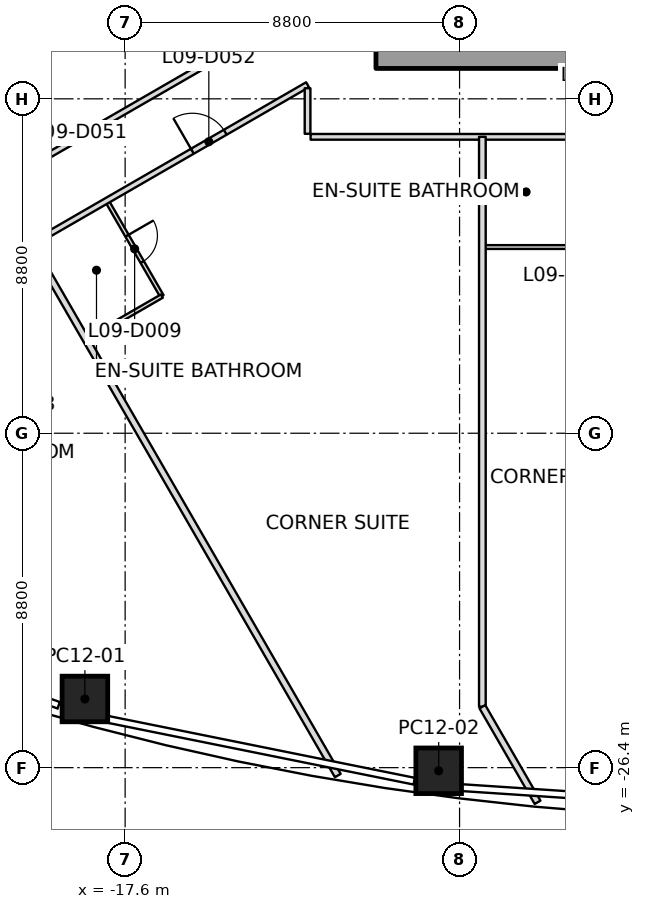
"""IFC4 building model, lengths in metres.
Left out: names, types, materials, properties, quantities, classifications, styles, units other than length and angle.
Written with IfcOpenShell. Run it as: python <this file> out.ifc"""

import sys

from ifc_helpers import new_model, si_unit, direction, frame, frame_2d, origin, origin_2d, place, context, subcontext, project, spatial, rectangle, extrude, clip, halfspace, element, fill, save


model = new_model("IFC4")
c1 = context("Model", 3, precision=1e-05, world=origin(), true_north=direction((0.0, 1.0)))
c2 = subcontext(c1, "Body", "Model", "MODEL_VIEW")
j1 = project(units=[si_unit("LENGTHUNIT", "METRE"), si_unit("PLANEANGLEUNIT", "RADIAN")], contexts=[c1])
p1 = place(None, origin())
s1 = spatial("IfcSite", under=j1, at=p1, CompositionType="ELEMENT")
p2 = place(p1, origin())
s2 = spatial("IfcBuilding", under=s1, at=p2, CompositionType="ELEMENT")
p3 = place(p2, frame((0.0, 0.0, 55.4)))
s3 = spatial("IfcBuildingStorey", under=s2, at=p3, CompositionType="ELEMENT", Elevation=55.4)
p4 = place(p3, frame((-18.659, -24.593, 0.0), z_axis=(0.018962740175, 0.175794991964, 0.984244144146), x_axis=(-0.964231408406, 0.26352619053, -0.028491015209)))
e1 = element("IfcColumn", 1, at=p4, inside=s3, PredefinedType="COLUMN", context=c2, shape_type="SweptSolid", body=[
    clip(clip(extrude(rectangle(XDim=1.2, YDim=1.2, at=origin_2d()), origin(), (0.0, 0.0, 1.0), 3.76), halfspace(frame((0.0, 0.0, 0.001)), True)), halfspace(frame((0.0, 0.0, 3.759)), False)),
])
p5 = place(p3, frame((-9.35, -26.482, 0.0), z_axis=(0.00938855127, 0.223717601847, 0.974608788042), x_axis=(0.984896435556, -0.170583568587, 0.029669131402)))
e2 = element("IfcColumn", 2, at=p5, inside=s3, PredefinedType="COLUMN", context=c2, shape_type="SweptSolid", body=[
    extrude(rectangle(XDim=1.2, YDim=1.2, at=origin_2d()), origin(), (0.0, 0.0, 1.0), 3.797),
])
p6 = place(p3, frame((-11.0, -7.75, 0.0), z_axis=(0.0, 0.0, 1.0), x_axis=(1.0, 0.0, 0.0)))
e3 = element("IfcWall", 3, at=p6, inside=s3, PredefinedType="SHEAR", context=c2, shape_type="SweptSolid", body=[
    extrude(rectangle(XDim=22.0, YDim=0.5, at=frame_2d((11.0, 0.0))), origin(), (0.0, 0.0, 1.0), 3.7),
])
p7 = place(p6, frame((10.45, 0.0, 0.0)))
e4 = element("IfcOpeningElement", 4, at=p7, cuts=e3, PredefinedType="OPENING", context=c2, shape_type="SweptSolid", body=[
    extrude(rectangle(XDim=1.1, YDim=2.1, at=frame_2d((0.55, 1.05))), frame((0.0, 0.25, 0.0), z_axis=(0.0, -1.0, 0.0), x_axis=(1.0, 0.0, 0.0)), (0.0, 0.0, 1.0), 0.5),
])
p8 = place(p3, frame((-20.075, -12.629, 0.0), z_axis=(0.0, 0.0, 1.0), x_axis=(0.499997848404, -0.866026646006, 0.0)))
e5 = element("IfcWall", 5, at=p8, inside=s3, PredefinedType="PARTITIONING", context=c2, shape_type="SweptSolid", body=[
    extrude(rectangle(XDim=16.141, YDim=0.175, at=frame_2d((8.07, 0.0))), origin(), (0.0, 0.0, 1.0), 2.784),
])
p9 = place(p3, frame((-8.2, -9.8, 0.0), z_axis=(0.0, 0.0, 1.0), x_axis=(0.0, -1.0, 0.0)))
e6 = element("IfcWall", 6, at=p9, inside=s3, PredefinedType="PARTITIONING", context=c2, shape_type="SweptSolid", body=[
    extrude(rectangle(XDim=14.997, YDim=0.175, at=frame_2d((7.498, 0.0))), origin(), (0.0, 0.0, 1.0), 3.0),
])
p10 = place(p3, frame((-8.2, -24.797, 0.0), z_axis=(0.0, 0.0, 1.0), x_axis=(0.499998917442, -0.866026028799, 0.0)))
e7 = element("IfcWall", 7, at=p10, inside=s3, PredefinedType="PARTITIONING", context=c2, shape_type="SweptSolid", body=[
    extrude(rectangle(XDim=2.905, YDim=0.175, at=frame_2d((1.452, 0.0))), origin(), (0.0, 0.0, 1.0), 2.784),
])
p11 = place(p3, frame((-12.8, -6.351, 0.0), z_axis=(0.0, 0.0, 1.0), x_axis=(-0.866018462269, -0.500012022864, 0.0)))
e8 = element("IfcWall", 8, at=p11, inside=s3, PredefinedType="PARTITIONING", context=c2, shape_type="SweptSolid", body=[
    extrude(rectangle(XDim=13.234, YDim=0.15, at=frame_2d((6.617, 0.0))), origin(), (0.0, 0.0, 1.0), 2.797),
])
p12 = place(p11, frame((11.834, 0.0, 0.0)))
e9 = element("IfcOpeningElement", 9, at=p12, cuts=e8, PredefinedType="OPENING", context=c2, shape_type="SweptSolid", body=[
    extrude(rectangle(XDim=1.0, YDim=2.1, at=frame_2d((0.5, 1.05))), frame((0.0, 0.075, 0.0), z_axis=(0.0, -1.0, 0.0), x_axis=(1.0, 0.0, 0.0)), (0.0, 0.0, 1.0), 0.15),
])
p13 = place(p3, frame((-23.292, -14.487, 0.0), z_axis=(0.0, 0.0, 1.0), x_axis=(0.866017117934, 0.50001435124, 0.0)))
e10 = element("IfcWall", 10, at=p13, inside=s3, PredefinedType="PARTITIONING", context=c2, shape_type="SweptSolid", body=[
    extrude(rectangle(XDim=12.115, YDim=0.15, at=frame_2d((6.058, 0.0))), origin(), (0.0, 0.0, 1.0), 2.797),
])
p14 = place(p13, frame((2.507, 0.0, 0.0)))
e11 = element("IfcOpeningElement", 11, at=p14, cuts=e10, PredefinedType="OPENING", context=c2, shape_type="SweptSolid", body=[
    extrude(rectangle(XDim=1.0, YDim=2.1, at=frame_2d((0.5, 1.05))), frame((0.0, 0.075, 0.0), z_axis=(0.0, -1.0, 0.0), x_axis=(1.0, 0.0, 0.0)), (0.0, 0.0, 1.0), 0.15),
])
p15 = place(p13, frame((8.615, 0.0, 0.0)))
e12 = element("IfcOpeningElement", 12, at=p15, cuts=e10, PredefinedType="OPENING", context=c2, shape_type="SweptSolid", body=[
    extrude(rectangle(XDim=1.0, YDim=2.1, at=frame_2d((0.5, 1.05))), frame((0.0, 0.075, 0.0), z_axis=(0.0, -1.0, 0.0), x_axis=(1.0, 0.0, 0.0)), (0.0, 0.0, 1.0), 0.15),
])
p16 = place(p3, frame((-12.8, -8.521, 0.0), z_axis=(0.0, 0.0, 1.0), x_axis=(0.0, -1.0, 0.0)))
e13 = element("IfcWall", 13, at=p16, inside=s3, PredefinedType="PARTITIONING", context=c2, shape_type="SweptSolid", body=[
    extrude(rectangle(XDim=1.199, YDim=0.15, at=frame_2d((0.6, 0.0))), origin(), (0.0, 0.0, 1.0), 2.797),
])
p17 = place(p3, frame((-12.72, -9.8, 0.0), z_axis=(0.0, 0.0, 1.0), x_axis=(1.0, 0.0, 0.0)))
e14 = element("IfcWall", 14, at=p17, inside=s3, PredefinedType="PARTITIONING", context=c2, shape_type="SweptSolid", body=[
    extrude(rectangle(XDim=25.44, YDim=0.15, at=frame_2d((12.72, 0.0))), origin(), (0.0, 0.0, 1.0), 2.797),
])
p18 = place(p17, frame((7.32, 0.0, 0.0)))
e15 = element("IfcOpeningElement", 15, at=p18, cuts=e14, PredefinedType="OPENING", context=c2, shape_type="SweptSolid", body=[
    extrude(rectangle(XDim=1.0, YDim=2.1, at=frame_2d((0.5, 1.05))), frame((0.0, 0.075, 0.0), z_axis=(0.0, -1.0, 0.0), x_axis=(1.0, 0.0, 0.0)), (0.0, 0.0, 1.0), 0.15),
])
p19 = place(p17, frame((11.52, 0.0, 0.0)))
e16 = element("IfcOpeningElement", 16, at=p19, cuts=e14, PredefinedType="OPENING", context=c2, shape_type="SweptSolid", body=[
    extrude(rectangle(XDim=1.0, YDim=2.1, at=frame_2d((0.5, 1.05))), frame((0.0, 0.075, 0.0), z_axis=(0.0, -1.0, 0.0), x_axis=(1.0, 0.0, 0.0)), (0.0, 0.0, 1.0), 0.15),
])
p20 = place(p17, frame((15.72, 0.0, 0.0)))
e17 = element("IfcOpeningElement", 17, at=p20, cuts=e14, PredefinedType="OPENING", context=c2, shape_type="SweptSolid", body=[
    extrude(rectangle(XDim=1.0, YDim=2.1, at=frame_2d((0.5, 1.05))), frame((0.0, 0.075, 0.0), z_axis=(0.0, -1.0, 0.0), x_axis=(1.0, 0.0, 0.0)), (0.0, 0.0, 1.0), 0.15),
])
p21 = place(p17, frame((19.92, 0.0, 0.0)))
e18 = element("IfcOpeningElement", 18, at=p21, cuts=e14, PredefinedType="OPENING", context=c2, shape_type="SweptSolid", body=[
    extrude(rectangle(XDim=1.0, YDim=2.1, at=frame_2d((0.5, 1.05))), frame((0.0, 0.075, 0.0), z_axis=(0.0, -1.0, 0.0), x_axis=(1.0, 0.0, 0.0)), (0.0, 0.0, 1.0), 0.15),
])
p22 = place(p3, frame((-18.068, -11.505, 0.0), z_axis=(0.0, 0.0, 1.0), x_axis=(0.500036638401, -0.866004249561, 0.0)))
e19 = element("IfcWall", 19, at=p22, inside=s3, PredefinedType="PARTITIONING", context=c2, shape_type="SweptSolid", body=[
    extrude(rectangle(XDim=2.87, YDim=0.1, at=frame_2d((1.435, 0.0))), origin(), (0.0, 0.0, 1.0), 2.797),
])
p23 = place(p22, frame((1.035, 0.0, 0.0)))
e20 = element("IfcOpeningElement", 20, at=p23, cuts=e19, PredefinedType="OPENING", context=c2, shape_type="SweptSolid", body=[
    extrude(rectangle(XDim=0.8, YDim=2.1, at=frame_2d((0.4, 1.05))), frame((0.0, 0.05, 0.0), z_axis=(0.0, -1.0, 0.0), x_axis=(1.0, 0.0, 0.0)), (0.0, 0.0, 1.0), 0.1),
])
p24 = place(p3, frame((-16.633, -13.991, 0.0), z_axis=(0.0, 0.0, 1.0), x_axis=(-0.866017224141, -0.500014167291, 0.0)))
e21 = element("IfcWall", 21, at=p24, inside=s3, PredefinedType="PARTITIONING", context=c2, shape_type="SweptSolid", body=[
    extrude(rectangle(XDim=2.27, YDim=0.1, at=frame_2d((1.135, 0.0))), origin(), (0.0, 0.0, 1.0), 3.0),
])
p25 = place(p3, frame((-5.9, -12.7, 0.0), z_axis=(0.0, 0.0, 1.0), x_axis=(-1.0, 0.0, 0.0)))
e22 = element("IfcWall", 22, at=p25, inside=s3, PredefinedType="PARTITIONING", context=c2, shape_type="SweptSolid", body=[
    extrude(rectangle(XDim=2.27, YDim=0.1, at=frame_2d((1.135, 0.0))), origin(), (0.0, 0.0, 1.0), 2.797),
])
p26 = place(p15, origin())
e23 = element("IfcDoor", 23, at=p26, inside=s3, OperationType="SINGLE_SWING_LEFT", PredefinedType="DOOR", context=c2, shape_type="SweptSolid", body=[
    extrude(rectangle(XDim=1.0, YDim=2.1, at=frame_2d((0.5, 1.05))), frame((0.0, 0.025, 0.0), z_axis=(0.0, -1.0, 0.0), x_axis=(1.0, 0.0, 0.0)), (0.0, 0.0, 1.0), 0.05),
])
fill(e12, e23)
p27 = place(p23, origin())
e24 = element("IfcDoor", 24, at=p27, inside=s3, OperationType="SINGLE_SWING_RIGHT", PredefinedType="DOOR", context=c2, shape_type="SweptSolid", body=[
    extrude(rectangle(XDim=0.8, YDim=2.1, at=frame_2d((0.4, 1.05))), frame((0.0, 0.025, 0.0), z_axis=(0.0, -1.0, 0.0), x_axis=(1.0, 0.0, 0.0)), (0.0, 0.0, 1.0), 0.05),
])
fill(e20, e24)
save(model, sys.argv[1])
